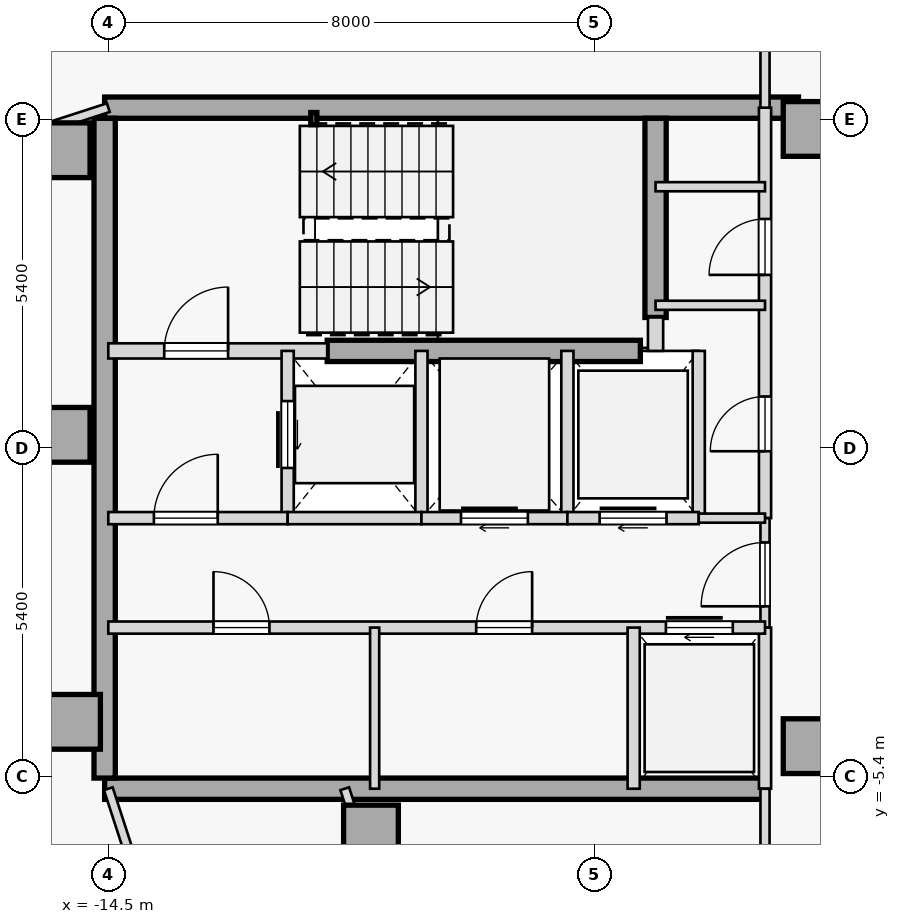
"""IFC4 building model, lengths in metres.
Left out: names, types, materials, properties, quantities, classifications, styles, units other than length and angle.
Written with IfcOpenShell. Run it as: python <this file> out.ifc"""

import sys

from ifc_helpers import new_model, si_unit, direction, frame, frame_2d, origin, origin_2d, place, context, subcontext, project, spatial, rectangle, hollow_rectangle, extrude, element, fill, save


model = new_model("IFC4")
c1 = context("Model", 3, precision=1e-05, world=origin(), true_north=direction((0.0, 1.0)))
c2 = subcontext(c1, "Body", "Model", "MODEL_VIEW")
j1 = project(units=[si_unit("LENGTHUNIT", "METRE"), si_unit("PLANEANGLEUNIT", "RADIAN")], contexts=[c1])
p1 = place(None, origin())
s1 = spatial("IfcSite", under=j1, at=p1, CompositionType="ELEMENT")
p2 = place(p1, origin())
s2 = spatial("IfcBuilding", under=s1, at=p2, CompositionType="ELEMENT")
p3 = place(p2, frame((0.0, 0.0, 247.75)))
s3 = spatial("IfcBuildingStorey", under=s2, at=p3, CompositionType="ELEMENT", Elevation=247.75)
for number, where, z_axis, x_axis in (
    (1, (-15.25, 4.9, 0.0), (0.0, 0.0, 1.0), (1.0, 0.0, 0.0)),
    (2, (-15.25, 0.22, 0.0), (0.0, 0.0, 1.0), (1.0, 0.0, 0.0)),
    (3, (-15.08, -4.5, 0.0), (0.0, 0.0, 1.0), (1.0, 0.0, 0.0)),
    (4, (-10.18, -6.32, 0.0), (0.0, 0.0, 1.0), (1.0, 0.0, 0.0)),
    (5, (-2.95, -4.9, 0.0), (0.0, 0.0, 1.0), (1.0, 0.0, 0.0)),
    (6, (-2.95, 5.25, 0.0), (0.0, 0.0, 1.0), (1.0, 0.0, 0.0)),
):
    element("IfcColumn", number, at=place(p3, frame(where, z_axis=z_axis, x_axis=x_axis)), inside=s3, PredefinedType="COLUMN", context=c2, shape_type="SweptSolid", body=[
        extrude(rectangle(XDim=0.9, YDim=0.9, at=origin_2d()), origin(), (0.0, 0.0, 1.0), 3.35),
    ])
p4 = place(p3, frame((-14.56, 5.6, 0.0), z_axis=(0.0, 0.0, 1.0), x_axis=(1.0, 0.0, 0.0)))
e7 = element("IfcWall", 7, at=p4, inside=s3, PredefinedType="SHEAR", context=c2, shape_type="SweptSolid", body=[
    extrude(rectangle(XDim=11.41, YDim=0.35, at=frame_2d((5.705, 0.0))), origin(), (0.0, 0.0, 1.0), 3.125),
])
p5 = place(p3, frame((-14.56, -5.6, 0.0), z_axis=(0.0, 0.0, 1.0), x_axis=(1.0, 0.0, 0.0)))
e8 = element("IfcWall", 8, at=p5, inside=s3, PredefinedType="SHEAR", context=c2, shape_type="SweptSolid", body=[
    extrude(rectangle(XDim=10.86, YDim=0.35, at=frame_2d((5.43, 0.0))), origin(), (0.0, 0.0, 1.0), 3.125),
])
p6 = place(p3, frame((-14.56, -5.425, 0.0), z_axis=(0.0, 0.0, 1.0), x_axis=(0.0, 1.0, 0.0)))
e9 = element("IfcWall", 9, at=p6, inside=s3, PredefinedType="SHEAR", context=c2, shape_type="SweptSolid", body=[
    extrude(rectangle(XDim=10.85, YDim=0.35, at=frame_2d((5.425, 0.0))), origin(), (0.0, 0.0, 1.0), 3.125),
])
p7 = place(p3, frame((-5.5, 2.15, 0.0), z_axis=(0.0, 0.0, 1.0), x_axis=(0.0, 1.0, 0.0)))
e10 = element("IfcWall", 10, at=p7, inside=s3, PredefinedType="SHEAR", context=c2, shape_type="SweptSolid", body=[
    extrude(rectangle(XDim=3.275, YDim=0.35, at=frame_2d((1.638, 0.0))), origin(), (0.0, 0.0, 1.0), 3.125),
])
p8 = place(p3, frame((-10.9, 1.6, 0.0), z_axis=(0.0, 0.0, 1.0), x_axis=(1.0, 0.0, 0.0)))
e11 = element("IfcWall", 11, at=p8, inside=s3, PredefinedType="SHEAR", context=c2, shape_type="SweptSolid", body=[
    extrude(rectangle(XDim=5.15, YDim=0.35, at=frame_2d((2.575, 0.0))), origin(), (0.0, 0.0, 1.0), 3.125),
])
p9 = place(p3, frame((-11.12, 5.42, 0.0), z_axis=(0.0, 0.0, 1.0), x_axis=(1.0, 0.0, 0.0)))
e12 = element("IfcColumn", 12, at=p9, inside=s3, PredefinedType="COLUMN", context=c2, shape_type="SweptSolid", body=[
    extrude(hollow_rectangle(XDim=0.1, YDim=0.2, WallThickness=0.008, at=origin_2d()), origin(), (0.0, 0.0, 1.0), 3.35),
])
p10 = place(p3, frame((-14.5, 1.6, 0.0), z_axis=(0.0, 0.0, 1.0), x_axis=(1.0, 0.0, 0.0)))
e13 = element("IfcWall", 13, at=p10, inside=s3, PredefinedType="STANDARD", context=c2, shape_type="SweptSolid", body=[
    extrude(rectangle(XDim=3.6, YDim=0.25, at=frame_2d((1.8, 0.0))), origin(), (0.0, 0.0, 1.0), 3.125),
])
p11 = place(p10, frame((0.92, 0.0, 0.0)))
e14 = element("IfcOpeningElement", 14, at=p11, cuts=e13, PredefinedType="OPENING", context=c2, shape_type="SweptSolid", body=[
    extrude(rectangle(XDim=1.05, YDim=2.15, at=frame_2d((0.525, 1.075))), frame((0.0, 0.135, 0.0), z_axis=(0.0, -1.0, 0.0), x_axis=(1.0, 0.0, 0.0)), (0.0, 0.0, 1.0), 0.27),
])
p12 = place(p3, frame((-5.5, 1.6, 0.0), z_axis=(0.0, 0.0, 1.0), x_axis=(0.0, 1.0, 0.0)))
e15 = element("IfcWall", 15, at=p12, inside=s3, PredefinedType="STANDARD", context=c2, shape_type="SweptSolid", body=[
    extrude(rectangle(XDim=0.55, YDim=0.25, at=frame_2d((0.275, 0.0))), origin(), (0.0, 0.0, 1.0), 3.125),
])
p13 = place(p3, frame((-3.7, -1.15, 0.0), z_axis=(0.0, 0.0, 1.0), x_axis=(0.0, 1.0, 0.0)))
e16 = element("IfcWall", 16, at=p13, inside=s3, PredefinedType="STANDARD", context=c2, shape_type="SweptSolid", body=[
    extrude(rectangle(XDim=6.75, YDim=0.2, at=frame_2d((3.375, 0.0))), origin(), (0.0, 0.0, 1.0), 3.125),
])
p14 = place(p13, frame((1.1, 0.0, 0.0)))
e17 = element("IfcOpeningElement", 17, at=p14, cuts=e16, PredefinedType="OPENING", context=c2, shape_type="SweptSolid", body=[
    extrude(rectangle(XDim=0.9, YDim=2.15, at=frame_2d((0.45, 1.075))), frame((0.0, 0.11, 0.0), z_axis=(0.0, -1.0, 0.0), x_axis=(1.0, 0.0, 0.0)), (0.0, 0.0, 1.0), 0.22),
])
p15 = place(p13, frame((4.0, 0.0, 0.0)))
e18 = element("IfcOpeningElement", 18, at=p15, cuts=e16, PredefinedType="OPENING", context=c2, shape_type="SweptSolid", body=[
    extrude(rectangle(XDim=0.92, YDim=2.15, at=frame_2d((0.46, 1.075))), frame((0.0, 0.11, 0.0), z_axis=(0.0, -1.0, 0.0), x_axis=(1.0, 0.0, 0.0)), (0.0, 0.0, 1.0), 0.22),
])
p16 = place(p3, frame((-3.7, -2.95, 0.0), z_axis=(0.0, 0.0, 1.0), x_axis=(0.0, 1.0, 0.0)))
e19 = element("IfcWall", 19, at=p16, inside=s3, PredefinedType="PARTITIONING", context=c2, shape_type="SweptSolid", body=[
    extrude(rectangle(XDim=1.8, YDim=0.15, at=frame_2d((0.9, 0.0))), origin(), (0.0, 0.0, 1.0), 3.125),
])
p17 = place(p16, frame((0.35, 0.0, 0.0)))
e20 = element("IfcOpeningElement", 20, at=p17, cuts=e19, PredefinedType="OPENING", context=c2, shape_type="SweptSolid", body=[
    extrude(rectangle(XDim=1.05, YDim=2.18, at=frame_2d((0.525, 1.09))), frame((0.0, 0.085, 0.0), z_axis=(0.0, -1.0, 0.0), x_axis=(1.0, 0.0, 0.0)), (0.0, 0.0, 1.0), 0.17),
])
p18 = place(p3, frame((-3.7, -5.6, 0.0), z_axis=(0.0, 0.0, 1.0), x_axis=(0.0, 1.0, 0.0)))
e21 = element("IfcWall", 21, at=p18, inside=s3, PredefinedType="STANDARD", context=c2, shape_type="SweptSolid", body=[
    extrude(rectangle(XDim=2.65, YDim=0.2, at=frame_2d((1.325, 0.0))), origin(), (0.0, 0.0, 1.0), 3.125),
])
p19 = place(p3, frame((-11.55, -1.15, 0.0), z_axis=(0.0, 0.0, 1.0), x_axis=(0.0, 1.0, 0.0)))
e22 = element("IfcWall", 22, at=p19, inside=s3, PredefinedType="STANDARD", context=c2, shape_type="SweptSolid", body=[
    extrude(rectangle(XDim=2.75, YDim=0.2, at=frame_2d((1.375, 0.0))), origin(), (0.0, 0.0, 1.0), 3.125),
])
p20 = place(p19, frame((0.825, 0.0, 0.0)))
e23 = element("IfcOpeningElement", 23, at=p20, cuts=e22, PredefinedType="OPENING", context=c2, shape_type="SweptSolid", body=[
    extrude(rectangle(XDim=1.1, YDim=2.15, at=frame_2d((0.55, 1.075))), frame((0.0, 0.11, 0.0), z_axis=(0.0, -1.0, 0.0), x_axis=(1.0, 0.0, 0.0)), (0.0, 0.0, 1.0), 0.22),
])
p21 = place(p3, frame((-9.35, -1.15, 0.0), z_axis=(0.0, 0.0, 1.0), x_axis=(0.0, 1.0, 0.0)))
e24 = element("IfcWall", 24, at=p21, inside=s3, PredefinedType="STANDARD", context=c2, shape_type="SweptSolid", body=[
    extrude(rectangle(XDim=2.75, YDim=0.2, at=frame_2d((1.375, 0.0))), origin(), (0.0, 0.0, 1.0), 3.125),
])
p22 = place(p3, frame((-14.5, -1.15, 0.0), z_axis=(0.0, 0.0, 1.0), x_axis=(1.0, 0.0, 0.0)))
e25 = element("IfcWall", 25, at=p22, inside=s3, PredefinedType="STANDARD", context=c2, shape_type="SweptSolid", body=[
    extrude(rectangle(XDim=2.95, YDim=0.2, at=frame_2d((1.475, 0.0))), origin(), (0.0, 0.0, 1.0), 3.125),
])
p23 = place(p22, frame((0.75, 0.0, 0.0)))
e26 = element("IfcOpeningElement", 26, at=p23, cuts=e25, PredefinedType="OPENING", context=c2, shape_type="SweptSolid", body=[
    extrude(rectangle(XDim=1.05, YDim=2.18, at=frame_2d((0.525, 1.09))), frame((0.0, 0.11, 0.0), z_axis=(0.0, -1.0, 0.0), x_axis=(1.0, 0.0, 0.0)), (0.0, 0.0, 1.0), 0.22),
])
p24 = place(p3, frame((-11.55, -1.15, 0.0), z_axis=(0.0, 0.0, 1.0), x_axis=(1.0, 0.0, 0.0)))
e27 = element("IfcWall", 27, at=p24, inside=s3, PredefinedType="STANDARD", context=c2, shape_type="SweptSolid", body=[
    extrude(rectangle(XDim=2.2, YDim=0.2, at=frame_2d((1.1, 0.0))), origin(), (0.0, 0.0, 1.0), 3.125),
])
p25 = place(p3, frame((-6.95, -1.15, 0.0), z_axis=(0.0, 0.0, 1.0), x_axis=(0.0, 1.0, 0.0)))
e28 = element("IfcWall", 28, at=p25, inside=s3, PredefinedType="STANDARD", context=c2, shape_type="SweptSolid", body=[
    extrude(rectangle(XDim=2.75, YDim=0.2, at=frame_2d((1.375, 0.0))), origin(), (0.0, 0.0, 1.0), 3.125),
])
p26 = place(p3, frame((-9.35, -1.15, 0.0), z_axis=(0.0, 0.0, 1.0), x_axis=(1.0, 0.0, 0.0)))
e29 = element("IfcWall", 29, at=p26, inside=s3, PredefinedType="STANDARD", context=c2, shape_type="SweptSolid", body=[
    extrude(rectangle(XDim=2.4, YDim=0.2, at=frame_2d((1.2, 0.0))), origin(), (0.0, 0.0, 1.0), 3.125),
])
p27 = place(p26, frame((0.65, 0.0, 0.0)))
e30 = element("IfcOpeningElement", 30, at=p27, cuts=e29, PredefinedType="OPENING", context=c2, shape_type="SweptSolid", body=[
    extrude(rectangle(XDim=1.1, YDim=2.15, at=frame_2d((0.55, 1.075))), frame((0.0, 0.11, 0.0), z_axis=(0.0, -1.0, 0.0), x_axis=(1.0, 0.0, 0.0)), (0.0, 0.0, 1.0), 0.22),
])
p28 = place(p3, frame((-4.79, -1.15, 0.0), z_axis=(0.0, 0.0, 1.0), x_axis=(0.0, 1.0, 0.0)))
e31 = element("IfcWall", 31, at=p28, inside=s3, PredefinedType="STANDARD", context=c2, shape_type="SweptSolid", body=[
    extrude(rectangle(XDim=2.75, YDim=0.2, at=frame_2d((1.375, 0.0))), origin(), (0.0, 0.0, 1.0), 3.125),
])
p29 = place(p3, frame((-6.95, -1.15, 0.0), z_axis=(0.0, 0.0, 1.0), x_axis=(1.0, 0.0, 0.0)))
e32 = element("IfcWall", 32, at=p29, inside=s3, PredefinedType="STANDARD", context=c2, shape_type="SweptSolid", body=[
    extrude(rectangle(XDim=2.16, YDim=0.2, at=frame_2d((1.08, 0.0))), origin(), (0.0, 0.0, 1.0), 3.125),
])
p30 = place(p29, frame((0.53, 0.0, 0.0)))
e33 = element("IfcOpeningElement", 33, at=p30, cuts=e32, PredefinedType="OPENING", context=c2, shape_type="SweptSolid", body=[
    extrude(rectangle(XDim=1.1, YDim=2.15, at=frame_2d((0.55, 1.075))), frame((0.0, 0.11, 0.0), z_axis=(0.0, -1.0, 0.0), x_axis=(1.0, 0.0, 0.0)), (0.0, 0.0, 1.0), 0.22),
])
p31 = place(p3, frame((-4.79, -1.15, 0.0), z_axis=(0.0, 0.0, 1.0), x_axis=(1.0, 0.0, 0.0)))
e34 = element("IfcWall", 34, at=p31, inside=s3, PredefinedType="PARTITIONING", context=c2, shape_type="SweptSolid", body=[
    extrude(rectangle(XDim=1.09, YDim=0.15, at=frame_2d((0.545, 0.0))), origin(), (0.0, 0.0, 1.0), 3.125),
])
p32 = place(p3, frame((-14.5, -2.95, 0.0), z_axis=(0.0, 0.0, 1.0), x_axis=(1.0, 0.0, 0.0)))
e35 = element("IfcWall", 35, at=p32, inside=s3, PredefinedType="STANDARD", context=c2, shape_type="SweptSolid", body=[
    extrude(rectangle(XDim=10.8, YDim=0.2, at=frame_2d((5.4, 0.0))), origin(), (0.0, 0.0, 1.0), 3.125),
])
p33 = place(p32, frame((9.17, 0.0, 0.0)))
e36 = element("IfcOpeningElement", 36, at=p33, cuts=e35, PredefinedType="OPENING", context=c2, shape_type="SweptSolid", body=[
    extrude(rectangle(XDim=1.1, YDim=2.15, at=frame_2d((0.55, 1.075))), frame((0.0, 0.11, 0.0), z_axis=(0.0, -1.0, 0.0), x_axis=(1.0, 0.0, 0.0)), (0.0, 0.0, 1.0), 0.22),
])
p34 = place(p32, frame((1.73, 0.0, 0.0)))
e37 = element("IfcOpeningElement", 37, at=p34, cuts=e35, PredefinedType="OPENING", context=c2, shape_type="SweptSolid", body=[
    extrude(rectangle(XDim=0.92, YDim=2.15, at=frame_2d((0.46, 1.075))), frame((0.0, 0.11, 0.0), z_axis=(0.0, -1.0, 0.0), x_axis=(1.0, 0.0, 0.0)), (0.0, 0.0, 1.0), 0.22),
])
p35 = place(p32, frame((6.05, 0.0, 0.0)))
e38 = element("IfcOpeningElement", 38, at=p35, cuts=e35, PredefinedType="OPENING", context=c2, shape_type="SweptSolid", body=[
    extrude(rectangle(XDim=0.92, YDim=2.15, at=frame_2d((0.46, 1.075))), frame((0.0, 0.11, 0.0), z_axis=(0.0, -1.0, 0.0), x_axis=(1.0, 0.0, 0.0)), (0.0, 0.0, 1.0), 0.22),
])
p36 = place(p3, frame((-5.86, -5.6, 0.0), z_axis=(0.0, 0.0, 1.0), x_axis=(0.0, 1.0, 0.0)))
e39 = element("IfcWall", 39, at=p36, inside=s3, PredefinedType="STANDARD", context=c2, shape_type="SweptSolid", body=[
    extrude(rectangle(XDim=2.65, YDim=0.2, at=frame_2d((1.325, 0.0))), origin(), (0.0, 0.0, 1.0), 3.125),
])
p37 = place(p3, frame((-10.12, -5.6, 0.0), z_axis=(0.0, 0.0, 1.0), x_axis=(0.0, 1.0, 0.0)))
e40 = element("IfcWall", 40, at=p37, inside=s3, PredefinedType="PARTITIONING", context=c2, shape_type="SweptSolid", body=[
    extrude(rectangle(XDim=2.65, YDim=0.15, at=frame_2d((1.325, 0.0))), origin(), (0.0, 0.0, 1.0), 3.125),
])
for number, where, z_axis, x_axis in (
    (41, (-5.5, 4.3, 0.0), (0.0, 0.0, 1.0), (1.0, 0.0, 0.0)),
    (42, (-5.5, 2.35, 0.0), (0.0, 0.0, 1.0), (1.0, 0.0, 0.0)),
):
    element("IfcWall", number, at=place(p3, frame(where, z_axis=z_axis, x_axis=x_axis)), inside=s3, PredefinedType="PARTITIONING", context=c2, shape_type="SweptSolid", body=[
        extrude(rectangle(XDim=1.8, YDim=0.15, at=frame_2d((0.9, 0.0))), origin(), (0.0, 0.0, 1.0), 3.125),
    ])
p38 = place(p3, frame((-19.497, 5.68, 0.0), z_axis=(0.0, 0.0, 1.0), x_axis=(0.95105300492, 0.309027801067, 0.0)))
e43 = element("IfcWall", 43, at=p38, inside=s3, PredefinedType="PARTITIONING", context=c2, shape_type="SweptSolid", body=[
    extrude(rectangle(XDim=14.779, YDim=0.15, at=frame_2d((7.39, 0.0))), origin(), (0.0, 0.0, 1.0), 3.125),
])
p39 = place(p38, frame((6.915, 0.0, 0.0)))
e44 = element("IfcOpeningElement", 44, at=p39, cuts=e43, PredefinedType="OPENING", context=c2, shape_type="SweptSolid", body=[
    extrude(rectangle(XDim=0.95, YDim=2.15, at=frame_2d((0.475, 1.075))), frame((0.0, 0.085, 0.0), z_axis=(0.0, -1.0, 0.0), x_axis=(1.0, 0.0, 0.0)), (0.0, 0.0, 1.0), 0.17),
])
p40 = place(p3, frame((-3.7, -11.514, 0.0), z_axis=(0.0, 0.0, 1.0), x_axis=(-8.2572974e-05, 0.999999996591, 0.0)))
e45 = element("IfcWall", 45, at=p40, inside=s3, PredefinedType="PARTITIONING", context=c2, shape_type="SweptSolid", body=[
    extrude(rectangle(XDim=5.913, YDim=0.15, at=frame_2d((2.957, 0.0))), origin(), (0.0, 0.0, 1.0), 3.125),
])
p41 = place(p40, frame((2.497, 0.0, 0.0)))
e46 = element("IfcOpeningElement", 46, at=p41, cuts=e45, PredefinedType="OPENING", context=c2, shape_type="SweptSolid", body=[
    extrude(rectangle(XDim=0.92, YDim=2.15, at=frame_2d((0.46, 1.075))), frame((0.0, 0.085, 0.0), z_axis=(0.0, -1.0, 0.0), x_axis=(1.0, 0.0, 0.0)), (0.0, 0.0, 1.0), 0.17),
])
p42 = place(p3, frame((-17.792, 4.531, 0.0), z_axis=(0.0, 0.0, 1.0), x_axis=(0.951047546178, 0.309044600193, 0.0)))
e47 = element("IfcWall", 47, at=p42, inside=s3, PredefinedType="PARTITIONING", context=c2, shape_type="SweptSolid", body=[
    extrude(rectangle(XDim=3.461, YDim=0.15, at=frame_2d((1.73, 0.0))), origin(), (0.0, 0.0, 1.0), 3.125),
])
p43 = place(p42, frame((0.302, 0.0, 0.0)))
e48 = element("IfcOpeningElement", 48, at=p43, cuts=e47, PredefinedType="OPENING", context=c2, shape_type="SweptSolid", body=[
    extrude(rectangle(XDim=0.92, YDim=2.15, at=frame_2d((0.46, 1.075))), frame((0.0, 0.085, 0.0), z_axis=(0.0, -1.0, 0.0), x_axis=(1.0, 0.0, 0.0)), (0.0, 0.0, 1.0), 0.17),
])
p44 = place(p3, frame((-3.7, 5.6, 0.0), z_axis=(0.0, 0.0, 1.0), x_axis=(0.000139120755, 0.999999990323, 0.0)))
e49 = element("IfcWall", 49, at=p44, inside=s3, PredefinedType="PARTITIONING", context=c2, shape_type="SweptSolid", body=[
    extrude(rectangle(XDim=3.51, YDim=0.15, at=frame_2d((1.755, 0.0))), origin(), (0.0, 0.0, 1.0), 3.125),
])
p45 = place(p3, frame((-30.663, -9.757, 0.0), z_axis=(0.0, 0.0, 1.0), x_axis=(0.951058192995, 0.309011833974, 0.0)))
e50 = element("IfcWall", 50, at=p45, inside=s3, PredefinedType="PARTITIONING", context=c2, shape_type="SweptSolid", body=[
    extrude(rectangle(XDim=16.657, YDim=0.15, at=frame_2d((8.329, 0.0))), origin(), (0.0, 0.0, 1.0), 3.125),
])
p46 = place(p3, frame((-13.488, -8.713, 0.0), z_axis=(0.0, 0.0, 1.0), x_axis=(-0.309082700143, 0.951035164687, 0.0)))
e51 = element("IfcWall", 51, at=p46, inside=s3, PredefinedType="PARTITIONING", context=c2, shape_type="SweptSolid", body=[
    extrude(rectangle(XDim=3.274, YDim=0.15, at=frame_2d((1.637, 0.0))), origin(), (0.0, 0.0, 1.0), 3.125),
])
p47 = place(p3, frame((-8.213, -12.98, 0.0), z_axis=(0.0, 0.0, 1.0), x_axis=(-0.309017065592, 0.951056493155, 0.0)))
e52 = element("IfcWall", 52, at=p47, inside=s3, PredefinedType="PARTITIONING", context=c2, shape_type="SweptSolid", body=[
    extrude(rectangle(XDim=7.76, YDim=0.15, at=frame_2d((3.88, 0.0))), origin(), (0.0, 0.0, 1.0), 3.125),
])
p48 = place(p11, origin())
e53 = element("IfcDoor", 53, at=p48, inside=s3, OperationType="SINGLE_SWING_RIGHT", PredefinedType="DOOR", context=c2, shape_type="SweptSolid", body=[
    extrude(rectangle(XDim=1.05, YDim=2.15, at=frame_2d((0.525, 1.075))), frame((0.0, 0.025, 0.0), z_axis=(0.0, -1.0, 0.0), x_axis=(1.0, 0.0, 0.0)), (0.0, 0.0, 1.0), 0.05),
])
fill(e14, e53)
p49 = place(p23, origin())
e54 = element("IfcDoor", 54, at=p49, inside=s3, OperationType="SINGLE_SWING_RIGHT", PredefinedType="DOOR", context=c2, shape_type="SweptSolid", body=[
    extrude(rectangle(XDim=1.05, YDim=2.18, at=frame_2d((0.525, 1.09))), frame((0.0, 0.025, 0.0), z_axis=(0.0, -1.0, 0.0), x_axis=(1.0, 0.0, 0.0)), (0.0, 0.0, 1.0), 0.05),
])
fill(e26, e54)
p50 = place(p17, origin())
e55 = element("IfcDoor", 55, at=p50, inside=s3, OperationType="SINGLE_SWING_LEFT", PredefinedType="DOOR", context=c2, shape_type="SweptSolid", body=[
    extrude(rectangle(XDim=1.05, YDim=2.18, at=frame_2d((0.525, 1.09))), frame((0.0, 0.025, 0.0), z_axis=(0.0, -1.0, 0.0), x_axis=(1.0, 0.0, 0.0)), (0.0, 0.0, 1.0), 0.05),
])
fill(e20, e55)
p51 = place(p20, origin())
e56 = element("IfcDoor", 56, at=p51, inside=s3, OperationType="SLIDING_TO_RIGHT", PredefinedType="DOOR", context=c2, shape_type="SweptSolid", body=[
    extrude(rectangle(XDim=1.1, YDim=2.15, at=frame_2d((0.55, 1.075))), frame((0.0, 0.025, 0.0), z_axis=(0.0, -1.0, 0.0), x_axis=(1.0, 0.0, 0.0)), (0.0, 0.0, 1.0), 0.05),
])
fill(e23, e56)
p52 = place(p27, origin())
e57 = element("IfcDoor", 57, at=p52, inside=s3, OperationType="SLIDING_TO_RIGHT", PredefinedType="DOOR", context=c2, shape_type="SweptSolid", body=[
    extrude(rectangle(XDim=1.1, YDim=2.15, at=frame_2d((0.55, 1.075))), frame((0.0, 0.025, 0.0), z_axis=(0.0, -1.0, 0.0), x_axis=(1.0, 0.0, 0.0)), (0.0, 0.0, 1.0), 0.05),
])
fill(e30, e57)
p53 = place(p30, origin())
e58 = element("IfcDoor", 58, at=p53, inside=s3, OperationType="SLIDING_TO_RIGHT", PredefinedType="DOOR", context=c2, shape_type="SweptSolid", body=[
    extrude(rectangle(XDim=1.1, YDim=2.15, at=frame_2d((0.55, 1.075))), frame((0.0, 0.025, 0.0), z_axis=(0.0, -1.0, 0.0), x_axis=(1.0, 0.0, 0.0)), (0.0, 0.0, 1.0), 0.05),
])
fill(e33, e58)
p54 = place(p33, origin())
e59 = element("IfcDoor", 59, at=p54, inside=s3, OperationType="SLIDING_TO_RIGHT", PredefinedType="DOOR", context=c2, shape_type="SweptSolid", body=[
    extrude(rectangle(XDim=1.1, YDim=2.15, at=frame_2d((0.55, 1.075))), frame((0.0, 0.025, 0.0), z_axis=(0.0, -1.0, 0.0), x_axis=(1.0, 0.0, 0.0)), (0.0, 0.0, 1.0), 0.05),
])
fill(e36, e59)
p55 = place(p34, origin())
e60 = element("IfcDoor", 60, at=p55, inside=s3, OperationType="SINGLE_SWING_LEFT", PredefinedType="DOOR", context=c2, shape_type="SweptSolid", body=[
    extrude(rectangle(XDim=0.92, YDim=2.15, at=frame_2d((0.46, 1.075))), frame((0.0, 0.025, 0.0), z_axis=(0.0, -1.0, 0.0), x_axis=(1.0, 0.0, 0.0)), (0.0, 0.0, 1.0), 0.05),
])
fill(e37, e60)
p56 = place(p35, origin())
e61 = element("IfcDoor", 61, at=p56, inside=s3, OperationType="SINGLE_SWING_RIGHT", PredefinedType="DOOR", context=c2, shape_type="SweptSolid", body=[
    extrude(rectangle(XDim=0.92, YDim=2.15, at=frame_2d((0.46, 1.075))), frame((0.0, 0.025, 0.0), z_axis=(0.0, -1.0, 0.0), x_axis=(1.0, 0.0, 0.0)), (0.0, 0.0, 1.0), 0.05),
])
fill(e38, e61)
p57 = place(p14, origin())
e62 = element("IfcDoor", 62, at=p57, inside=s3, OperationType="SINGLE_SWING_LEFT", PredefinedType="DOOR", context=c2, shape_type="SweptSolid", body=[
    extrude(rectangle(XDim=0.9, YDim=2.15, at=frame_2d((0.45, 1.075))), frame((0.0, 0.025, 0.0), z_axis=(0.0, -1.0, 0.0), x_axis=(1.0, 0.0, 0.0)), (0.0, 0.0, 1.0), 0.05),
])
fill(e17, e62)
p58 = place(p15, origin())
e63 = element("IfcDoor", 63, at=p58, inside=s3, OperationType="SINGLE_SWING_LEFT", PredefinedType="DOOR", context=c2, shape_type="SweptSolid", body=[
    extrude(rectangle(XDim=0.92, YDim=2.15, at=frame_2d((0.46, 1.075))), frame((0.0, 0.025, 0.0), z_axis=(0.0, -1.0, 0.0), x_axis=(1.0, 0.0, 0.0)), (0.0, 0.0, 1.0), 0.05),
])
fill(e18, e63)
save(model, sys.argv[1])
